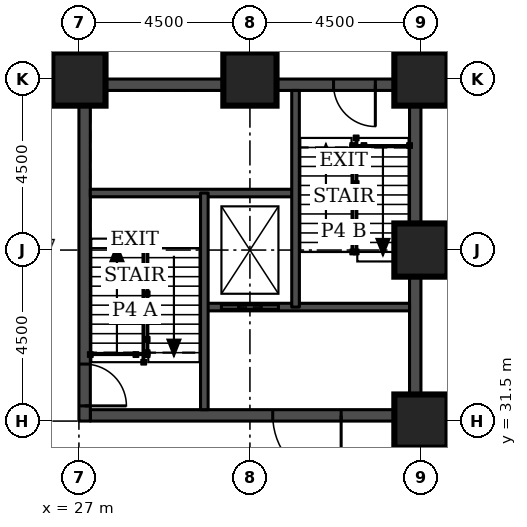
"""IFC4 building model, lengths in metres.
Left out: names, types, materials, properties, quantities, classifications, styles, units other than length and angle.
Written with IfcOpenShell. Run it as: python <this file> out.ifc"""

import sys

from ifc_helpers import new_model, si_unit, direction, frame, frame_2d, origin, origin_2d, place, context, subcontext, project, spatial, rectangle, extrude, element, fill, save


model = new_model("IFC4")
c1 = context("Model", 3, precision=1e-05, world=origin(), true_north=direction((0.0, 1.0)))
c2 = subcontext(c1, "Body", "Model", "MODEL_VIEW")
j1 = project(units=[si_unit("LENGTHUNIT", "METRE"), si_unit("PLANEANGLEUNIT", "RADIAN")], contexts=[c1])
p1 = place(None, origin())
s1 = spatial("IfcSite", under=j1, at=p1, CompositionType="ELEMENT")
p2 = place(p1, origin())
s2 = spatial("IfcBuilding", under=s1, at=p2, CompositionType="ELEMENT")
p3 = place(p2, frame((0.0, 0.0, -4.5)))
s3 = spatial("IfcBuildingStorey", under=s2, at=p3, CompositionType="ELEMENT", Elevation=-4.5)
for number, where, z_axis, x_axis in (
    (1, (36.0, 31.5, 0.0), (0.0, 0.0, 1.0), (1.0, 0.0, 0.0)),
    (2, (36.0, 36.0, 0.0), (0.0, 0.0, 1.0), (1.0, 0.0, 0.0)),
    (3, (27.0, 40.5, 0.0), (0.0, 0.0, 1.0), (1.0, 0.0, 0.0)),
    (4, (31.5, 40.5, 0.0), (0.0, 0.0, 1.0), (1.0, 0.0, 0.0)),
    (5, (36.0, 40.5, 0.0), (0.0, 0.0, 1.0), (1.0, 0.0, 0.0)),
):
    element("IfcColumn", number, at=place(p3, frame(where, z_axis=z_axis, x_axis=x_axis)), inside=s3, PredefinedType="COLUMN", context=c2, shape_type="SweptSolid", body=[
        extrude(rectangle(XDim=1.4, YDim=1.4, at=origin_2d()), origin(), (0.0, 0.0, 1.0), 4.5),
    ])
p4 = place(p3, frame((27.3, 31.65, 0.0), z_axis=(0.0, 0.0, 1.0), x_axis=(1.0, 0.0, 0.0)))
e6 = element("IfcWall", 6, at=p4, inside=s3, PredefinedType="SHEAR", context=c2, shape_type="SweptSolid", body=[
    extrude(rectangle(XDim=8.4, YDim=0.3, at=frame_2d((4.2, 0.0))), origin(), (0.0, 0.0, 1.0), 4.5),
])
p5 = place(p4, frame((4.8, 0.0, 0.0)))
e7 = element("IfcOpeningElement", 7, at=p5, cuts=e6, PredefinedType="OPENING", context=c2, shape_type="SweptSolid", body=[
    extrude(rectangle(XDim=1.8, YDim=2.1, at=frame_2d((0.9, 1.05))), frame((0.0, 0.16, 0.0), z_axis=(0.0, -1.0, 0.0), x_axis=(1.0, 0.0, 0.0)), (0.0, 0.0, 1.0), 0.32),
])
p6 = place(p3, frame((27.3, 40.35, 0.0), z_axis=(0.0, 0.0, 1.0), x_axis=(1.0, 0.0, 0.0)))
e8 = element("IfcWall", 8, at=p6, inside=s3, PredefinedType="SHEAR", context=c2, shape_type="SweptSolid", body=[
    extrude(rectangle(XDim=8.4, YDim=0.3, at=frame_2d((4.2, 0.0))), origin(), (0.0, 0.0, 1.0), 4.5),
])
p7 = place(p6, frame((6.4, 0.0, 0.0)))
e9 = element("IfcOpeningElement", 9, at=p7, cuts=e8, PredefinedType="OPENING", context=c2, shape_type="SweptSolid", body=[
    extrude(rectangle(XDim=1.1, YDim=2.1, at=frame_2d((0.55, 1.05))), frame((0.0, 0.16, 0.0), z_axis=(0.0, -1.0, 0.0), x_axis=(1.0, 0.0, 0.0)), (0.0, 0.0, 1.0), 0.32),
])
p8 = place(p3, frame((27.15, 31.5, 0.0), z_axis=(0.0, 0.0, 1.0), x_axis=(0.0, 1.0, 0.0)))
e10 = element("IfcWall", 10, at=p8, inside=s3, PredefinedType="SHEAR", context=c2, shape_type="SweptSolid", body=[
    extrude(rectangle(XDim=9.0, YDim=0.3, at=frame_2d((4.5, 0.0))), origin(), (0.0, 0.0, 1.0), 4.5),
])
p9 = place(p8, frame((0.4, 0.0, 0.0)))
e11 = element("IfcOpeningElement", 11, at=p9, cuts=e10, PredefinedType="OPENING", context=c2, shape_type="SweptSolid", body=[
    extrude(rectangle(XDim=1.1, YDim=2.1, at=frame_2d((0.55, 1.05))), frame((0.0, 0.16, 0.0), z_axis=(0.0, -1.0, 0.0), x_axis=(1.0, 0.0, 0.0)), (0.0, 0.0, 1.0), 0.32),
])
p10 = place(p3, frame((35.85, 31.5, 0.0), z_axis=(0.0, 0.0, 1.0), x_axis=(0.0, 1.0, 0.0)))
e12 = element("IfcWall", 12, at=p10, inside=s3, PredefinedType="SHEAR", context=c2, shape_type="SweptSolid", body=[
    extrude(rectangle(XDim=9.0, YDim=0.3, at=frame_2d((4.5, 0.0))), origin(), (0.0, 0.0, 1.0), 4.5),
])
p11 = place(p3, frame((30.3, 34.5, 0.0), z_axis=(0.0, 0.0, 1.0), x_axis=(1.0, 0.0, 0.0)))
e13 = element("IfcWall", 13, at=p11, inside=s3, PredefinedType="SOLIDWALL", context=c2, shape_type="SweptSolid", body=[
    extrude(rectangle(XDim=5.4, YDim=0.2, at=frame_2d((2.7, 0.0))), origin(), (0.0, 0.0, 1.0), 4.1),
])
p12 = place(p11, frame((0.45, 0.0, 0.0)))
e14 = element("IfcOpeningElement", 14, at=p12, cuts=e13, PredefinedType="OPENING", context=c2, shape_type="SweptSolid", body=[
    extrude(rectangle(XDim=1.5, YDim=2.1, at=frame_2d((0.75, 1.05))), frame((0.0, 0.11, 0.0), z_axis=(0.0, -1.0, 0.0), x_axis=(1.0, 0.0, 0.0)), (0.0, 0.0, 1.0), 0.22),
])
p13 = place(p3, frame((27.3, 37.5, 0.0), z_axis=(0.0, 0.0, 1.0), x_axis=(1.0, 0.0, 0.0)))
e15 = element("IfcWall", 15, at=p13, inside=s3, PredefinedType="SOLIDWALL", context=c2, shape_type="SweptSolid", body=[
    extrude(rectangle(XDim=5.4, YDim=0.2, at=frame_2d((2.7, 0.0))), origin(), (0.0, 0.0, 1.0), 4.1),
])
for number, where, z_axis, x_axis in (
    (16, (30.3, 31.8, 0.0), (0.0, 0.0, 1.0), (0.0, 1.0, 0.0)),
    (17, (32.7, 34.5, 0.0), (0.0, 0.0, 1.0), (0.0, 1.0, 0.0)),
):
    element("IfcWall", number, at=place(p3, frame(where, z_axis=z_axis, x_axis=x_axis)), inside=s3, PredefinedType="SOLIDWALL", context=c2, shape_type="SweptSolid", body=[
        extrude(rectangle(XDim=5.7, YDim=0.2, at=frame_2d((2.85, 0.0))), origin(), (0.0, 0.0, 1.0), 4.1),
    ])
p14 = place(p9, frame((1.1, 0.0, 0.0), z_axis=(0.0, 0.0, 1.0), x_axis=(-1.0, 0.0, 0.0)))
e18 = element("IfcDoor", 18, at=p14, inside=s3, OperationType="SINGLE_SWING_RIGHT", PredefinedType="DOOR", context=c2, shape_type="SweptSolid", body=[
    extrude(rectangle(XDim=1.1, YDim=2.1, at=frame_2d((0.55, 1.05))), frame((0.0, 0.025, 0.0), z_axis=(0.0, -1.0, 0.0), x_axis=(1.0, 0.0, 0.0)), (0.0, 0.0, 1.0), 0.05),
])
fill(e11, e18)
p15 = place(p7, frame((1.1, 0.0, 0.0), z_axis=(0.0, 0.0, 1.0), x_axis=(-1.0, 0.0, 0.0)))
e19 = element("IfcDoor", 19, at=p15, inside=s3, OperationType="SINGLE_SWING_LEFT", PredefinedType="DOOR", context=c2, shape_type="SweptSolid", body=[
    extrude(rectangle(XDim=1.1, YDim=2.1, at=frame_2d((0.55, 1.05))), frame((0.0, 0.025, 0.0), z_axis=(0.0, -1.0, 0.0), x_axis=(1.0, 0.0, 0.0)), (0.0, 0.0, 1.0), 0.05),
])
fill(e9, e19)
p16 = place(p12, origin())
e20 = element("IfcDoor", 20, at=p16, inside=s3, OperationType="DOUBLE_DOOR_SLIDING", PredefinedType="DOOR", context=c2, shape_type="SweptSolid", body=[
    extrude(rectangle(XDim=1.5, YDim=2.1, at=frame_2d((0.75, 1.05))), frame((0.0, 0.025, 0.0), z_axis=(0.0, -1.0, 0.0), x_axis=(1.0, 0.0, 0.0)), (0.0, 0.0, 1.0), 0.05),
])
fill(e14, e20)
p17 = place(p5, frame((1.8, 0.0, 0.0), z_axis=(0.0, 0.0, 1.0), x_axis=(-1.0, 0.0, 0.0)))
e21 = element("IfcDoor", 21, at=p17, inside=s3, OperationType="SINGLE_SWING_LEFT", PredefinedType="DOOR", context=c2, shape_type="SweptSolid", body=[
    extrude(rectangle(XDim=1.8, YDim=2.1, at=frame_2d((0.9, 1.05))), frame((0.0, 0.025, 0.0), z_axis=(0.0, -1.0, 0.0), x_axis=(1.0, 0.0, 0.0)), (0.0, 0.0, 1.0), 0.05),
])
fill(e7, e21)
save(model, sys.argv[1])
